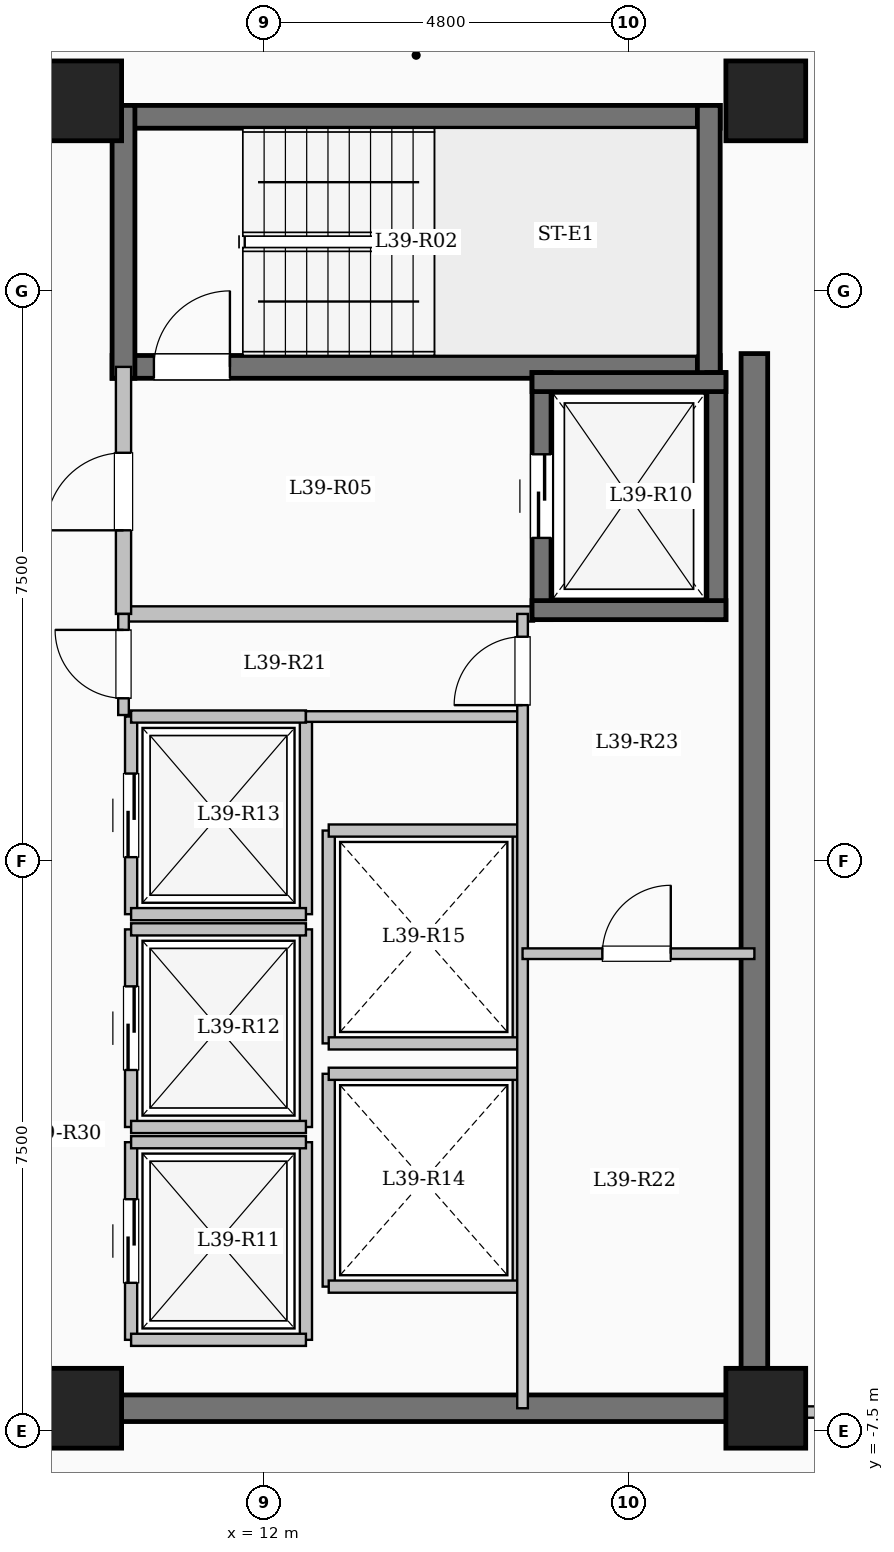
"""IFC4 building model, lengths in metres.
Left out: names, types, materials, properties, quantities, classifications, styles, units other than length and angle.
Written with IfcOpenShell. Run it as: python <this file> out.ifc"""

import sys

from ifc_helpers import new_model, si_unit, direction, frame, frame_2d, origin, origin_2d, place, context, subcontext, project, spatial, rectangle, extrude, element, fill, save


model = new_model("IFC4")
c1 = context("Model", 3, precision=1e-05, world=origin(), true_north=direction((0.0, 1.0)))
c2 = subcontext(c1, "Body", "Model", "MODEL_VIEW")
j1 = project(units=[si_unit("LENGTHUNIT", "METRE"), si_unit("PLANEANGLEUNIT", "RADIAN")], contexts=[c1])
p1 = place(None, origin())
s1 = spatial("IfcSite", under=j1, at=p1, CompositionType="ELEMENT")
p2 = place(p1, origin())
s2 = spatial("IfcBuilding", under=s1, at=p2, CompositionType="ELEMENT")
p3 = place(p2, frame((0.0, 0.0, 146.0)))
s3 = spatial("IfcBuildingStorey", under=s2, at=p3, CompositionType="ELEMENT", Elevation=146.0)
for number, where, z_axis, x_axis in (
    (1, (9.6, -7.2, 0.0), (0.0, 0.0, 1.0), (1.0, 0.0, 0.0)),
    (2, (9.6, 10.0, 0.0), (0.0, 0.0, 1.0), (1.0, 0.0, 0.0)),
    (3, (18.6, -7.2, 0.0), (0.0, 0.0, 1.0), (1.0, 0.0, 0.0)),
    (4, (18.6, 10.0, 0.0), (0.0, 0.0, 1.0), (1.0, 0.0, 0.0)),
):
    element("IfcColumn", number, at=place(p3, frame(where, z_axis=z_axis, x_axis=x_axis)), inside=s3, PredefinedType="COLUMN", context=c2, shape_type="SweptSolid", body=[
        extrude(rectangle(XDim=1.05, YDim=1.05, at=origin_2d()), origin(), (0.0, 0.0, 1.0), 3.35),
    ])
p4 = place(p3, frame((10.0, 9.79, 0.0), z_axis=(0.0, 0.0, 1.0), x_axis=(1.0, 0.0, 0.0)))
e5 = element("IfcWall", 5, at=p4, inside=s3, PredefinedType="SHEAR", context=c2, shape_type="SweptSolid", body=[
    extrude(rectangle(XDim=8.0, YDim=0.3, at=frame_2d((4.0, 0.0))), origin(), (0.0, 0.0, 1.0), 3.35),
])
p5 = place(p3, frame((10.0, 6.5, 0.0), z_axis=(0.0, 0.0, 1.0), x_axis=(1.0, 0.0, 0.0)))
e6 = element("IfcWall", 6, at=p5, inside=s3, PredefinedType="SHEAR", context=c2, shape_type="SweptSolid", body=[
    extrude(rectangle(XDim=8.0, YDim=0.3, at=frame_2d((4.0, 0.0))), origin(), (0.0, 0.0, 1.0), 3.35),
])
p6 = place(p5, frame((0.55, 0.0, 0.0)))
e7 = element("IfcOpeningElement", 7, at=p6, cuts=e6, PredefinedType="OPENING", context=c2, shape_type="SweptSolid", body=[
    extrude(rectangle(XDim=1.0, YDim=2.15, at=frame_2d((0.5, 1.075))), frame((0.0, 0.16, 0.0), z_axis=(0.0, -1.0, 0.0), x_axis=(1.0, 0.0, 0.0)), (0.0, 0.0, 1.0), 0.32),
])
for number, where, z_axis, x_axis in (
    (8, (10.15, 6.35, 0.0), (0.0, 0.0, 1.0), (0.0, 1.0, 0.0)),
    (9, (17.85, 6.35, 0.0), (0.0, 0.0, 1.0), (0.0, 1.0, 0.0)),
):
    element("IfcWall", number, at=place(p3, frame(where, z_axis=z_axis, x_axis=x_axis)), inside=s3, PredefinedType="SHEAR", context=c2, shape_type="SweptSolid", body=[
        extrude(rectangle(XDim=3.59, YDim=0.3, at=frame_2d((1.795, 0.0))), origin(), (0.0, 0.0, 1.0), 3.35),
    ])
p7 = place(p3, frame((10.15, 3.25, 0.0), z_axis=(0.0, 0.0, 1.0), x_axis=(1.0, 0.0, 0.0)))
e10 = element("IfcWall", 10, at=p7, inside=s3, PredefinedType="SOLIDWALL", context=c2, shape_type="SweptSolid", body=[
    extrude(rectangle(XDim=5.4, YDim=0.2, at=frame_2d((2.7, 0.0))), origin(), (0.0, 0.0, 1.0), 3.1),
])
p8 = place(p3, frame((10.15, 3.25, 0.0), z_axis=(0.0, 0.0, 1.0), x_axis=(0.0, 1.0, 0.0)))
e11 = element("IfcWall", 11, at=p8, inside=s3, PredefinedType="SOLIDWALL", context=c2, shape_type="SweptSolid", body=[
    extrude(rectangle(XDim=3.25, YDim=0.2, at=frame_2d((1.625, 0.0))), origin(), (0.0, 0.0, 1.0), 3.1),
])
p9 = place(p8, frame((1.1, 0.0, 0.0)))
e12 = element("IfcOpeningElement", 12, at=p9, cuts=e11, PredefinedType="OPENING", context=c2, shape_type="SweptSolid", body=[
    extrude(rectangle(XDim=1.02, YDim=2.15, at=frame_2d((0.51, 1.075))), frame((0.0, 0.11, 0.0), z_axis=(0.0, -1.0, 0.0), x_axis=(1.0, 0.0, 0.0)), (0.0, 0.0, 1.0), 0.22),
])
p10 = place(p3, frame((15.65, 3.175, 0.0), z_axis=(0.0, 0.0, 1.0), x_axis=(0.0, 1.0, 0.0)))
e13 = element("IfcWall", 13, at=p10, inside=s3, PredefinedType="SHEAR", context=c2, shape_type="SweptSolid", body=[
    extrude(rectangle(XDim=3.25, YDim=0.25, at=frame_2d((1.625, 0.0))), origin(), (0.0, 0.0, 1.0), 3.35),
])
p11 = place(p10, frame((1.075, 0.0, 0.0)))
e14 = element("IfcOpeningElement", 14, at=p11, cuts=e13, PredefinedType="OPENING", context=c2, shape_type="SweptSolid", body=[
    extrude(rectangle(XDim=1.1, YDim=2.15, at=frame_2d((0.55, 1.075))), frame((0.0, 0.135, 0.0), z_axis=(0.0, -1.0, 0.0), x_axis=(1.0, 0.0, 0.0)), (0.0, 0.0, 1.0), 0.27),
])
p12 = place(p3, frame((17.95, 3.175, 0.0), z_axis=(0.0, 0.0, 1.0), x_axis=(0.0, 1.0, 0.0)))
e15 = element("IfcWall", 15, at=p12, inside=s3, PredefinedType="SHEAR", context=c2, shape_type="SweptSolid", body=[
    extrude(rectangle(XDim=3.25, YDim=0.25, at=frame_2d((1.625, 0.0))), origin(), (0.0, 0.0, 1.0), 3.35),
])
for number, where, z_axis, x_axis in (
    (16, (15.525, 3.3, 0.0), (0.0, 0.0, 1.0), (1.0, 0.0, 0.0)),
    (17, (15.525, 6.3, 0.0), (0.0, 0.0, 1.0), (1.0, 0.0, 0.0)),
):
    element("IfcWall", number, at=place(p3, frame(where, z_axis=z_axis, x_axis=x_axis)), inside=s3, PredefinedType="SHEAR", context=c2, shape_type="SweptSolid", body=[
        extrude(rectangle(XDim=2.55, YDim=0.25, at=frame_2d((1.275, 0.0))), origin(), (0.0, 0.0, 1.0), 3.35),
    ])
p13 = place(p3, frame((10.25, -6.3, 0.0), z_axis=(0.0, 0.0, 1.0), x_axis=(0.0, 1.0, 0.0)))
e18 = element("IfcWall", 18, at=p13, inside=s3, PredefinedType="SOLIDWALL", context=c2, shape_type="SweptSolid", body=[
    extrude(rectangle(XDim=2.6, YDim=0.16, at=frame_2d((1.3, 0.0))), origin(), (0.0, 0.0, 1.0), 3.1),
])
p14 = place(p13, frame((0.75, 0.0, 0.0)))
e19 = element("IfcOpeningElement", 19, at=p14, cuts=e18, PredefinedType="OPENING", context=c2, shape_type="SweptSolid", body=[
    extrude(rectangle(XDim=1.1, YDim=2.15, at=frame_2d((0.55, 1.075))), frame((0.0, 0.09, 0.0), z_axis=(0.0, -1.0, 0.0), x_axis=(1.0, 0.0, 0.0)), (0.0, 0.0, 1.0), 0.18),
])
p15 = place(p3, frame((12.55, -6.3, 0.0), z_axis=(0.0, 0.0, 1.0), x_axis=(0.0, 1.0, 0.0)))
e20 = element("IfcWall", 20, at=p15, inside=s3, PredefinedType="SOLIDWALL", context=c2, shape_type="SweptSolid", body=[
    extrude(rectangle(XDim=2.6, YDim=0.16, at=frame_2d((1.3, 0.0))), origin(), (0.0, 0.0, 1.0), 3.1),
])
for number, where, z_axis, x_axis in (
    (21, (10.25, -6.3, 0.0), (0.0, 0.0, 1.0), (1.0, 0.0, 0.0)),
    (22, (10.25, -3.7, 0.0), (0.0, 0.0, 1.0), (1.0, 0.0, 0.0)),
):
    element("IfcWall", number, at=place(p3, frame(where, z_axis=z_axis, x_axis=x_axis)), inside=s3, PredefinedType="SOLIDWALL", context=c2, shape_type="SweptSolid", body=[
        extrude(rectangle(XDim=2.3, YDim=0.16, at=frame_2d((1.15, 0.0))), origin(), (0.0, 0.0, 1.0), 3.1),
    ])
p16 = place(p3, frame((10.25, -3.5, 0.0), z_axis=(0.0, 0.0, 1.0), x_axis=(0.0, 1.0, 0.0)))
e23 = element("IfcWall", 23, at=p16, inside=s3, PredefinedType="SOLIDWALL", context=c2, shape_type="SweptSolid", body=[
    extrude(rectangle(XDim=2.6, YDim=0.16, at=frame_2d((1.3, 0.0))), origin(), (0.0, 0.0, 1.0), 3.1),
])
p17 = place(p16, frame((0.75, 0.0, 0.0)))
e24 = element("IfcOpeningElement", 24, at=p17, cuts=e23, PredefinedType="OPENING", context=c2, shape_type="SweptSolid", body=[
    extrude(rectangle(XDim=1.1, YDim=2.15, at=frame_2d((0.55, 1.075))), frame((0.0, 0.09, 0.0), z_axis=(0.0, -1.0, 0.0), x_axis=(1.0, 0.0, 0.0)), (0.0, 0.0, 1.0), 0.18),
])
p18 = place(p3, frame((12.55, -3.5, 0.0), z_axis=(0.0, 0.0, 1.0), x_axis=(0.0, 1.0, 0.0)))
e25 = element("IfcWall", 25, at=p18, inside=s3, PredefinedType="SOLIDWALL", context=c2, shape_type="SweptSolid", body=[
    extrude(rectangle(XDim=2.6, YDim=0.16, at=frame_2d((1.3, 0.0))), origin(), (0.0, 0.0, 1.0), 3.1),
])
for number, where, z_axis, x_axis in (
    (26, (10.25, -3.5, 0.0), (0.0, 0.0, 1.0), (1.0, 0.0, 0.0)),
    (27, (10.25, -0.9, 0.0), (0.0, 0.0, 1.0), (1.0, 0.0, 0.0)),
):
    element("IfcWall", number, at=place(p3, frame(where, z_axis=z_axis, x_axis=x_axis)), inside=s3, PredefinedType="SOLIDWALL", context=c2, shape_type="SweptSolid", body=[
        extrude(rectangle(XDim=2.3, YDim=0.16, at=frame_2d((1.15, 0.0))), origin(), (0.0, 0.0, 1.0), 3.1),
    ])
p19 = place(p3, frame((10.25, -0.7, 0.0), z_axis=(0.0, 0.0, 1.0), x_axis=(0.0, 1.0, 0.0)))
e28 = element("IfcWall", 28, at=p19, inside=s3, PredefinedType="SOLIDWALL", context=c2, shape_type="SweptSolid", body=[
    extrude(rectangle(XDim=2.6, YDim=0.16, at=frame_2d((1.3, 0.0))), origin(), (0.0, 0.0, 1.0), 3.1),
])
p20 = place(p19, frame((0.75, 0.0, 0.0)))
e29 = element("IfcOpeningElement", 29, at=p20, cuts=e28, PredefinedType="OPENING", context=c2, shape_type="SweptSolid", body=[
    extrude(rectangle(XDim=1.1, YDim=2.15, at=frame_2d((0.55, 1.075))), frame((0.0, 0.09, 0.0), z_axis=(0.0, -1.0, 0.0), x_axis=(1.0, 0.0, 0.0)), (0.0, 0.0, 1.0), 0.18),
])
p21 = place(p3, frame((12.55, -0.7, 0.0), z_axis=(0.0, 0.0, 1.0), x_axis=(0.0, 1.0, 0.0)))
e30 = element("IfcWall", 30, at=p21, inside=s3, PredefinedType="SOLIDWALL", context=c2, shape_type="SweptSolid", body=[
    extrude(rectangle(XDim=2.6, YDim=0.16, at=frame_2d((1.3, 0.0))), origin(), (0.0, 0.0, 1.0), 3.1),
])
for number, where, z_axis, x_axis in (
    (31, (10.25, -0.7, 0.0), (0.0, 0.0, 1.0), (1.0, 0.0, 0.0)),
    (32, (10.25, 1.9, 0.0), (0.0, 0.0, 1.0), (1.0, 0.0, 0.0)),
):
    element("IfcWall", number, at=place(p3, frame(where, z_axis=z_axis, x_axis=x_axis)), inside=s3, PredefinedType="SOLIDWALL", context=c2, shape_type="SweptSolid", body=[
        extrude(rectangle(XDim=2.3, YDim=0.16, at=frame_2d((1.15, 0.0))), origin(), (0.0, 0.0, 1.0), 3.1),
    ])
for number, where, z_axis, x_axis in (
    (33, (12.85, -5.6, 0.0), (0.0, 0.0, 1.0), (0.0, 1.0, 0.0)),
    (34, (15.35, -5.6, 0.0), (0.0, 0.0, 1.0), (0.0, 1.0, 0.0)),
):
    element("IfcWall", number, at=place(p3, frame(where, z_axis=z_axis, x_axis=x_axis)), inside=s3, PredefinedType="SOLIDWALL", context=c2, shape_type="SweptSolid", body=[
        extrude(rectangle(XDim=2.8, YDim=0.16, at=frame_2d((1.4, 0.0))), origin(), (0.0, 0.0, 1.0), 3.1),
    ])
for number, where, z_axis, x_axis in (
    (35, (12.85, -5.6, 0.0), (0.0, 0.0, 1.0), (1.0, 0.0, 0.0)),
    (36, (12.85, -2.8, 0.0), (0.0, 0.0, 1.0), (1.0, 0.0, 0.0)),
):
    element("IfcWall", number, at=place(p3, frame(where, z_axis=z_axis, x_axis=x_axis)), inside=s3, PredefinedType="SOLIDWALL", context=c2, shape_type="SweptSolid", body=[
        extrude(rectangle(XDim=2.5, YDim=0.16, at=frame_2d((1.25, 0.0))), origin(), (0.0, 0.0, 1.0), 3.1),
    ])
for number, where, z_axis, x_axis in (
    (37, (12.85, -2.4, 0.0), (0.0, 0.0, 1.0), (0.0, 1.0, 0.0)),
    (38, (15.35, -2.4, 0.0), (0.0, 0.0, 1.0), (0.0, 1.0, 0.0)),
):
    element("IfcWall", number, at=place(p3, frame(where, z_axis=z_axis, x_axis=x_axis)), inside=s3, PredefinedType="SOLIDWALL", context=c2, shape_type="SweptSolid", body=[
        extrude(rectangle(XDim=2.8, YDim=0.16, at=frame_2d((1.4, 0.0))), origin(), (0.0, 0.0, 1.0), 3.1),
    ])
for number, where, z_axis, x_axis in (
    (39, (12.85, -2.4, 0.0), (0.0, 0.0, 1.0), (1.0, 0.0, 0.0)),
    (40, (12.85, 0.4, 0.0), (0.0, 0.0, 1.0), (1.0, 0.0, 0.0)),
):
    element("IfcWall", number, at=place(p3, frame(where, z_axis=z_axis, x_axis=x_axis)), inside=s3, PredefinedType="SOLIDWALL", context=c2, shape_type="SweptSolid", body=[
        extrude(rectangle(XDim=2.5, YDim=0.16, at=frame_2d((1.25, 0.0))), origin(), (0.0, 0.0, 1.0), 3.1),
    ])
p22 = place(p3, frame((18.45, -7.375, 0.0), z_axis=(0.0, 0.0, 1.0), x_axis=(0.0, 1.0, 0.0)))
e41 = element("IfcWall", 41, at=p22, inside=s3, PredefinedType="SHEAR", context=c2, shape_type="SweptSolid", body=[
    extrude(rectangle(XDim=14.05, YDim=0.35, at=frame_2d((7.025, 0.0))), origin(), (0.0, 0.0, 1.0), 3.35),
])
p23 = place(p3, frame((10.075, -7.2, 0.0), z_axis=(0.0, 0.0, 1.0), x_axis=(1.0, 0.0, 0.0)))
e42 = element("IfcWall", 42, at=p23, inside=s3, PredefinedType="SHEAR", context=c2, shape_type="SweptSolid", body=[
    extrude(rectangle(XDim=8.55, YDim=0.35, at=frame_2d((4.275, 0.0))), origin(), (0.0, 0.0, 1.0), 3.35),
])
p24 = place(p3, frame((12.55, 1.9, 0.0), z_axis=(0.0, 0.0, 1.0), x_axis=(1.0, 0.0, 0.0)))
e43 = element("IfcWall", 43, at=p24, inside=s3, PredefinedType="PARTITIONING", context=c2, shape_type="SweptSolid", body=[
    extrude(rectangle(XDim=2.85, YDim=0.14, at=frame_2d((1.425, 0.0))), origin(), (0.0, 0.0, 1.0), 3.1),
])
p25 = place(p3, frame((10.15, 1.92, 0.0), z_axis=(0.0, 0.0, 1.0), x_axis=(0.0, 1.0, 0.0)))
e44 = element("IfcWall", 44, at=p25, inside=s3, PredefinedType="PARTITIONING", context=c2, shape_type="SweptSolid", body=[
    extrude(rectangle(XDim=1.33, YDim=0.14, at=frame_2d((0.665, 0.0))), origin(), (0.0, 0.0, 1.0), 3.1),
])
p26 = place(p25, frame((0.22, 0.0, 0.0)))
e45 = element("IfcOpeningElement", 45, at=p26, cuts=e44, PredefinedType="OPENING", context=c2, shape_type="SweptSolid", body=[
    extrude(rectangle(XDim=0.9, YDim=2.08, at=frame_2d((0.45, 1.04))), frame((0.0, 0.08, 0.0), z_axis=(0.0, -1.0, 0.0), x_axis=(1.0, 0.0, 0.0)), (0.0, 0.0, 1.0), 0.16),
])
p27 = place(p3, frame((15.4, -7.2, 0.0), z_axis=(0.0, 0.0, 1.0), x_axis=(0.0, 1.0, 0.0)))
e46 = element("IfcWall", 46, at=p27, inside=s3, PredefinedType="PARTITIONING", context=c2, shape_type="SweptSolid", body=[
    extrude(rectangle(XDim=10.45, YDim=0.14, at=frame_2d((5.225, 0.0))), origin(), (0.0, 0.0, 1.0), 3.1),
])
p28 = place(p27, frame((9.25, 0.0, 0.0)))
e47 = element("IfcOpeningElement", 47, at=p28, cuts=e46, PredefinedType="OPENING", context=c2, shape_type="SweptSolid", body=[
    extrude(rectangle(XDim=0.9, YDim=2.08, at=frame_2d((0.45, 1.04))), frame((0.0, 0.08, 0.0), z_axis=(0.0, -1.0, 0.0), x_axis=(1.0, 0.0, 0.0)), (0.0, 0.0, 1.0), 0.16),
])
p29 = place(p3, frame((15.4, -1.22, 0.0), z_axis=(0.0, 0.0, 1.0), x_axis=(1.0, 0.0, 0.0)))
e48 = element("IfcWall", 48, at=p29, inside=s3, PredefinedType="PARTITIONING", context=c2, shape_type="SweptSolid", body=[
    extrude(rectangle(XDim=3.05, YDim=0.14, at=frame_2d((1.525, 0.0))), origin(), (0.0, 0.0, 1.0), 3.1),
])
p30 = place(p29, frame((1.05, 0.0, 0.0)))
e49 = element("IfcOpeningElement", 49, at=p30, cuts=e48, PredefinedType="OPENING", context=c2, shape_type="SweptSolid", body=[
    extrude(rectangle(XDim=0.9, YDim=2.08, at=frame_2d((0.45, 1.04))), frame((0.0, 0.08, 0.0), z_axis=(0.0, -1.0, 0.0), x_axis=(1.0, 0.0, 0.0)), (0.0, 0.0, 1.0), 0.16),
])
p31 = place(p3, frame((18.45, -7.25, 0.0), z_axis=(0.0, 0.0, 1.0), x_axis=(1.0, 0.0, 0.0)))
e50 = element("IfcWall", 50, at=p31, inside=s3, PredefinedType="PARTITIONING", context=c2, shape_type="SweptSolid", body=[
    extrude(rectangle(XDim=6.63, YDim=0.15, at=frame_2d((3.315, 0.0))), origin(), (0.0, 0.0, 1.0), 3.1),
])
p32 = place(p31, frame((1.95, 0.0, 0.0)))
e51 = element("IfcOpeningElement", 51, at=p32, cuts=e50, PredefinedType="OPENING", context=c2, shape_type="SweptSolid", body=[
    extrude(rectangle(XDim=1.08, YDim=2.15, at=frame_2d((0.54, 1.075))), frame((0.0, 0.085, 0.0), z_axis=(0.0, -1.0, 0.0), x_axis=(1.0, 0.0, 0.0)), (0.0, 0.0, 1.0), 0.17),
])
p33 = place(p6, origin())
e52 = element("IfcDoor", 52, at=p33, inside=s3, OperationType="SINGLE_SWING_RIGHT", PredefinedType="DOOR", context=c2, shape_type="SweptSolid", body=[
    extrude(rectangle(XDim=1.0, YDim=2.15, at=frame_2d((0.5, 1.075))), frame((0.0, 0.025, 0.0), z_axis=(0.0, -1.0, 0.0), x_axis=(1.0, 0.0, 0.0)), (0.0, 0.0, 1.0), 0.05),
])
fill(e7, e52)
p34 = place(p9, origin())
e53 = element("IfcDoor", 53, at=p34, inside=s3, OperationType="SINGLE_SWING_LEFT", PredefinedType="DOOR", context=c2, shape_type="SweptSolid", body=[
    extrude(rectangle(XDim=1.02, YDim=2.15, at=frame_2d((0.51, 1.075))), frame((0.0, 0.025, 0.0), z_axis=(0.0, -1.0, 0.0), x_axis=(1.0, 0.0, 0.0)), (0.0, 0.0, 1.0), 0.05),
])
fill(e12, e53)
p35 = place(p11, origin())
e54 = element("IfcDoor", 54, at=p35, inside=s3, OperationType="SLIDING_TO_LEFT", PredefinedType="DOOR", context=c2, shape_type="SweptSolid", body=[
    extrude(rectangle(XDim=1.1, YDim=2.15, at=frame_2d((0.55, 1.075))), frame((0.0, 0.025, 0.0), z_axis=(0.0, -1.0, 0.0), x_axis=(1.0, 0.0, 0.0)), (0.0, 0.0, 1.0), 0.05),
])
fill(e14, e54)
p36 = place(p14, origin())
e55 = element("IfcDoor", 55, at=p36, inside=s3, OperationType="SLIDING_TO_LEFT", PredefinedType="DOOR", context=c2, shape_type="SweptSolid", body=[
    extrude(rectangle(XDim=1.1, YDim=2.15, at=frame_2d((0.55, 1.075))), frame((0.0, 0.025, 0.0), z_axis=(0.0, -1.0, 0.0), x_axis=(1.0, 0.0, 0.0)), (0.0, 0.0, 1.0), 0.05),
])
fill(e19, e55)
p37 = place(p17, origin())
e56 = element("IfcDoor", 56, at=p37, inside=s3, OperationType="SLIDING_TO_LEFT", PredefinedType="DOOR", context=c2, shape_type="SweptSolid", body=[
    extrude(rectangle(XDim=1.1, YDim=2.15, at=frame_2d((0.55, 1.075))), frame((0.0, 0.025, 0.0), z_axis=(0.0, -1.0, 0.0), x_axis=(1.0, 0.0, 0.0)), (0.0, 0.0, 1.0), 0.05),
])
fill(e24, e56)
p38 = place(p20, origin())
e57 = element("IfcDoor", 57, at=p38, inside=s3, OperationType="SLIDING_TO_LEFT", PredefinedType="DOOR", context=c2, shape_type="SweptSolid", body=[
    extrude(rectangle(XDim=1.1, YDim=2.15, at=frame_2d((0.55, 1.075))), frame((0.0, 0.025, 0.0), z_axis=(0.0, -1.0, 0.0), x_axis=(1.0, 0.0, 0.0)), (0.0, 0.0, 1.0), 0.05),
])
fill(e29, e57)
p39 = place(p26, origin())
e58 = element("IfcDoor", 58, at=p39, inside=s3, OperationType="SINGLE_SWING_RIGHT", PredefinedType="DOOR", context=c2, shape_type="SweptSolid", body=[
    extrude(rectangle(XDim=0.9, YDim=2.08, at=frame_2d((0.45, 1.04))), frame((0.0, 0.025, 0.0), z_axis=(0.0, -1.0, 0.0), x_axis=(1.0, 0.0, 0.0)), (0.0, 0.0, 1.0), 0.05),
])
fill(e45, e58)
p40 = place(p28, origin())
e59 = element("IfcDoor", 59, at=p40, inside=s3, OperationType="SINGLE_SWING_LEFT", PredefinedType="DOOR", context=c2, shape_type="SweptSolid", body=[
    extrude(rectangle(XDim=0.9, YDim=2.08, at=frame_2d((0.45, 1.04))), frame((0.0, 0.025, 0.0), z_axis=(0.0, -1.0, 0.0), x_axis=(1.0, 0.0, 0.0)), (0.0, 0.0, 1.0), 0.05),
])
fill(e47, e59)
p41 = place(p30, origin())
e60 = element("IfcDoor", 60, at=p41, inside=s3, OperationType="SINGLE_SWING_RIGHT", PredefinedType="DOOR", context=c2, shape_type="SweptSolid", body=[
    extrude(rectangle(XDim=0.9, YDim=2.08, at=frame_2d((0.45, 1.04))), frame((0.0, 0.025, 0.0), z_axis=(0.0, -1.0, 0.0), x_axis=(1.0, 0.0, 0.0)), (0.0, 0.0, 1.0), 0.05),
])
fill(e49, e60)
save(model, sys.argv[1])
